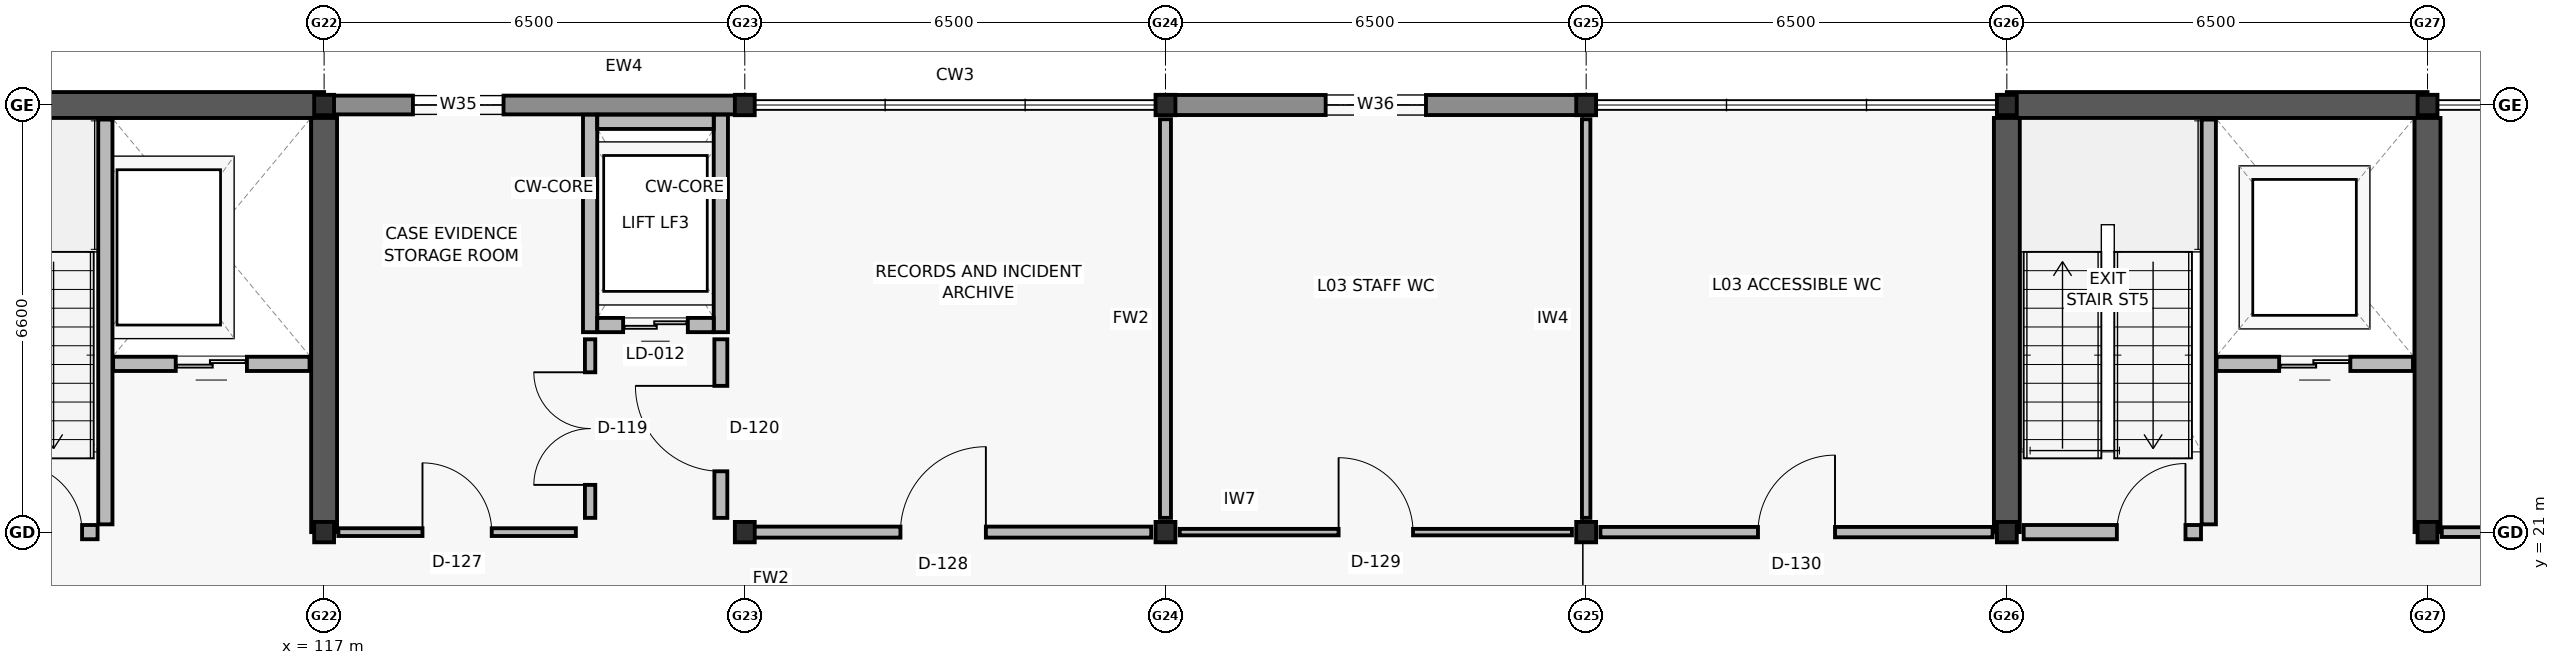
"""IFC4 building model, lengths in metres.
Left out: names, types, materials, properties, quantities, classifications, styles, units other than length and angle.
Written with IfcOpenShell. Run it as: python <this file> out.ifc"""

import sys

from ifc_helpers import new_model, si_unit, direction, frame, frame_2d, origin, origin_2d, place, context, subcontext, project, spatial, rectangle, i_section, extrude, element, fill, save


model = new_model("IFC4")
c1 = context("Model", 3, precision=1e-05, world=origin(), true_north=direction((0.0, 1.0)))
c2 = subcontext(c1, "Body", "Model", "MODEL_VIEW")
j1 = project(units=[si_unit("LENGTHUNIT", "METRE"), si_unit("PLANEANGLEUNIT", "RADIAN")], contexts=[c1])
p1 = place(None, origin())
s1 = spatial("IfcSite", under=j1, at=p1, CompositionType="ELEMENT")
p2 = place(p1, origin())
s2 = spatial("IfcBuilding", under=s1, at=p2, CompositionType="ELEMENT")
p3 = place(p2, frame((0.0, 0.0, 13.5)))
s3 = spatial("IfcBuildingStorey", under=s2, at=p3, CompositionType="ELEMENT", Elevation=13.5)
for number, where, z_axis, x_axis in (
    (1, (117.0, 21.0, 0.0), (0.0, 0.0, 1.0), (1.0, 0.0, 0.0)),
    (2, (117.0, 27.6, 0.0), (0.0, 0.0, 1.0), (1.0, 0.0, 0.0)),
    (3, (123.5, 21.0, 0.0), (0.0, 0.0, 1.0), (1.0, 0.0, 0.0)),
    (4, (123.5, 27.6, 0.0), (0.0, 0.0, 1.0), (1.0, 0.0, 0.0)),
    (5, (130.0, 21.0, 0.0), (0.0, 0.0, 1.0), (1.0, 0.0, 0.0)),
    (6, (130.0, 27.6, 0.0), (0.0, 0.0, 1.0), (1.0, 0.0, 0.0)),
    (7, (136.5, 21.0, 0.0), (0.0, 0.0, 1.0), (1.0, 0.0, 0.0)),
    (8, (136.5, 27.6, 0.0), (0.0, 0.0, 1.0), (1.0, 0.0, 0.0)),
    (9, (143.0, 21.0, 0.0), (0.0, 0.0, 1.0), (1.0, 0.0, 0.0)),
    (10, (143.0, 27.6, 0.0), (0.0, 0.0, 1.0), (1.0, 0.0, 0.0)),
    (11, (149.5, 21.0, 0.0), (0.0, 0.0, 1.0), (1.0, 0.0, 0.0)),
    (12, (149.5, 27.6, 0.0), (0.0, 0.0, 1.0), (1.0, 0.0, 0.0)),
):
    element("IfcColumn", number, at=place(p3, frame(where, z_axis=z_axis, x_axis=x_axis)), inside=s3, PredefinedType="COLUMN", context=c2, shape_type="SweptSolid", body=[
        extrude(i_section(OverallWidth=0.307, OverallDepth=0.315, WebThickness=0.012, FlangeThickness=0.019, FilletRadius=0.017, at=origin_2d()), origin(), (0.0, 0.0, 1.0), 3.9),
    ])
p4 = place(p3, frame((110.5, 27.6, 0.0), z_axis=(0.0, 0.0, 1.0), x_axis=(1.0, 0.0, 0.0)))
e13 = element("IfcWall", 13, at=p4, inside=s3, PredefinedType="SHEAR", context=c2, shape_type="SweptSolid", body=[
    extrude(rectangle(XDim=6.5, YDim=0.4, at=frame_2d((3.25, 0.0))), origin(), (0.0, 0.0, 1.0), 3.66),
])
p5 = place(p3, frame((117.0, 21.0, 0.0), z_axis=(0.0, 0.0, 1.0), x_axis=(0.0, 1.0, 0.0)))
e14 = element("IfcWall", 14, at=p5, inside=s3, PredefinedType="SHEAR", context=c2, shape_type="SweptSolid", body=[
    extrude(rectangle(XDim=6.4, YDim=0.4, at=frame_2d((3.2, 0.0))), origin(), (0.0, 0.0, 1.0), 3.66),
])
p6 = place(p3, frame((143.0, 27.6, 0.0), z_axis=(0.0, 0.0, 1.0), x_axis=(1.0, 0.0, 0.0)))
e15 = element("IfcWall", 15, at=p6, inside=s3, PredefinedType="SHEAR", context=c2, shape_type="SweptSolid", body=[
    extrude(rectangle(XDim=6.5, YDim=0.4, at=frame_2d((3.25, 0.0))), origin(), (0.0, 0.0, 1.0), 3.66),
])
for number, where, z_axis, x_axis in (
    (16, (143.0, 21.0, 0.0), (0.0, 0.0, 1.0), (0.0, 1.0, 0.0)),
    (17, (149.5, 21.0, 0.0), (0.0, 0.0, 1.0), (0.0, 1.0, 0.0)),
):
    element("IfcWall", number, at=place(p3, frame(where, z_axis=z_axis, x_axis=x_axis)), inside=s3, PredefinedType="SHEAR", context=c2, shape_type="SweptSolid", body=[
        extrude(rectangle(XDim=6.4, YDim=0.4, at=frame_2d((3.2, 0.0))), origin(), (0.0, 0.0, 1.0), 3.66),
    ])
p7 = place(p3, frame((117.005, 27.6, 0.0), z_axis=(0.0, 0.0, 1.0), x_axis=(1.0, 0.0, 0.0)))
e18 = element("IfcWall", 18, at=p7, inside=s3, PredefinedType="SOLIDWALL", context=c2, shape_type="SweptSolid", body=[
    extrude(rectangle(XDim=6.49, YDim=0.29, at=frame_2d((3.245, 0.0))), origin(), (0.0, 0.0, 1.0), 3.02),
])
p8 = place(p7, frame((1.367, 0.0, 0.8)))
e19 = element("IfcOpeningElement", 19, at=p8, cuts=e18, PredefinedType="OPENING", context=c2, shape_type="SweptSolid", body=[
    extrude(rectangle(XDim=1.4, YDim=1.5, at=frame_2d((0.7, 0.75))), frame((0.0, 0.155, 0.0), z_axis=(0.0, -1.0, 0.0), x_axis=(1.0, 0.0, 0.0)), (0.0, 0.0, 1.0), 0.31),
])
p9 = place(p3, frame((130.005, 27.6, 0.0), z_axis=(0.0, 0.0, 1.0), x_axis=(1.0, 0.0, 0.0)))
e20 = element("IfcWall", 20, at=p9, inside=s3, PredefinedType="SOLIDWALL", context=c2, shape_type="SweptSolid", body=[
    extrude(rectangle(XDim=6.49, YDim=0.31, at=frame_2d((3.245, 0.0))), origin(), (0.0, 0.0, 1.0), 3.02),
])
p10 = place(p9, frame((2.47, 0.0, 0.8)))
e21 = element("IfcOpeningElement", 21, at=p10, cuts=e20, PredefinedType="OPENING", context=c2, shape_type="SweptSolid", body=[
    extrude(rectangle(XDim=1.55, YDim=1.5, at=frame_2d((0.775, 0.75))), frame((0.0, 0.165, 0.0), z_axis=(0.0, -1.0, 0.0), x_axis=(1.0, 0.0, 0.0)), (0.0, 0.0, 1.0), 0.33),
])
p11 = place(p3, frame((113.62, 21.12, 0.0), z_axis=(0.0, 0.0, 1.0), x_axis=(0.0, 1.0, 0.0)))
e22 = element("IfcWall", 22, at=p11, inside=s3, PredefinedType="SOLIDWALL", context=c2, shape_type="SweptSolid", body=[
    extrude(rectangle(XDim=6.255, YDim=0.22, at=frame_2d((3.127, 0.0))), origin(), (0.0, 0.0, 1.0), 3.66),
])
p12 = place(p3, frame((110.76, 21.0, 0.0), z_axis=(0.0, 0.0, 1.0), x_axis=(1.0, 0.0, 0.0)))
e23 = element("IfcWall", 23, at=p12, inside=s3, PredefinedType="SOLIDWALL", context=c2, shape_type="SweptSolid", body=[
    extrude(rectangle(XDim=2.74, YDim=0.22, at=frame_2d((1.37, 0.0))), origin(), (0.0, 0.0, 1.0), 3.02),
])
p13 = place(p12, frame((1.44, 0.0, 0.0)))
e24 = element("IfcOpeningElement", 24, at=p13, cuts=e23, PredefinedType="OPENING", context=c2, shape_type="SweptSolid", body=[
    extrude(rectangle(XDim=1.06, YDim=2.1, at=frame_2d((0.53, 1.05))), frame((0.0, 0.12, 0.0), z_axis=(0.0, -1.0, 0.0), x_axis=(1.0, 0.0, 0.0)), (0.0, 0.0, 1.0), 0.24),
])
p14 = place(p3, frame((113.74, 23.6, 0.0), z_axis=(0.0, 0.0, 1.0), x_axis=(1.0, 0.0, 0.0)))
e25 = element("IfcWall", 25, at=p14, inside=s3, PredefinedType="SOLIDWALL", context=c2, shape_type="SweptSolid", body=[
    extrude(rectangle(XDim=3.035, YDim=0.22, at=frame_2d((1.518, 0.0))), origin(), (0.0, 0.0, 1.0), 3.66),
])
p15 = place(p14, frame((0.968, 0.0, 0.0)))
e26 = element("IfcOpeningElement", 26, at=p15, cuts=e25, PredefinedType="OPENING", context=c2, shape_type="SweptSolid", body=[
    extrude(rectangle(XDim=1.1, YDim=2.1, at=frame_2d((0.55, 1.05))), frame((0.0, 0.12, 0.0), z_axis=(0.0, -1.0, 0.0), x_axis=(1.0, 0.0, 0.0)), (0.0, 0.0, 1.0), 0.24),
])
for number, where, z_axis, x_axis in (
    (27, (121.11, 24.09, 0.0), (0.0, 0.0, 1.0), (0.0, 1.0, 0.0)),
    (28, (123.13, 24.09, 0.0), (0.0, 0.0, 1.0), (0.0, 1.0, 0.0)),
):
    element("IfcWall", number, at=place(p3, frame(where, z_axis=z_axis, x_axis=x_axis)), inside=s3, PredefinedType="SOLIDWALL", context=c2, shape_type="SweptSolid", body=[
        extrude(rectangle(XDim=3.36, YDim=0.22, at=frame_2d((1.68, 0.0))), origin(), (0.0, 0.0, 1.0), 3.66),
    ])
p16 = place(p3, frame((121.22, 27.34, 0.0), z_axis=(0.0, 0.0, 1.0), x_axis=(1.0, 0.0, 0.0)))
e29 = element("IfcWall", 29, at=p16, inside=s3, PredefinedType="SOLIDWALL", context=c2, shape_type="SweptSolid", body=[
    extrude(rectangle(XDim=1.8, YDim=0.22, at=frame_2d((0.9, 0.0))), origin(), (0.0, 0.0, 1.0), 3.66),
])
p17 = place(p3, frame((121.22, 24.2, 0.0), z_axis=(0.0, 0.0, 1.0), x_axis=(1.0, 0.0, 0.0)))
e30 = element("IfcWall", 30, at=p17, inside=s3, PredefinedType="SOLIDWALL", context=c2, shape_type="SweptSolid", body=[
    extrude(rectangle(XDim=1.8, YDim=0.22, at=frame_2d((0.9, 0.0))), origin(), (0.0, 0.0, 1.0), 3.66),
])
p18 = place(p17, frame((0.4, 0.0, 0.0)))
e31 = element("IfcOpeningElement", 31, at=p18, cuts=e30, PredefinedType="OPENING", context=c2, shape_type="SweptSolid", body=[
    extrude(rectangle(XDim=1.0, YDim=2.1, at=frame_2d((0.5, 1.05))), frame((0.0, 0.12, 0.0), z_axis=(0.0, -1.0, 0.0), x_axis=(1.0, 0.0, 0.0)), (0.0, 0.0, 1.0), 0.24),
])
p19 = place(p3, frame((146.12, 21.12, 0.0), z_axis=(0.0, 0.0, 1.0), x_axis=(0.0, 1.0, 0.0)))
e32 = element("IfcWall", 32, at=p19, inside=s3, PredefinedType="SOLIDWALL", context=c2, shape_type="SweptSolid", body=[
    extrude(rectangle(XDim=6.255, YDim=0.22, at=frame_2d((3.127, 0.0))), origin(), (0.0, 0.0, 1.0), 3.66),
])
p20 = place(p3, frame((143.26, 21.0, 0.0), z_axis=(0.0, 0.0, 1.0), x_axis=(1.0, 0.0, 0.0)))
e33 = element("IfcWall", 33, at=p20, inside=s3, PredefinedType="SOLIDWALL", context=c2, shape_type="SweptSolid", body=[
    extrude(rectangle(XDim=2.74, YDim=0.22, at=frame_2d((1.37, 0.0))), origin(), (0.0, 0.0, 1.0), 3.02),
])
p21 = place(p20, frame((1.44, 0.0, 0.0)))
e34 = element("IfcOpeningElement", 34, at=p21, cuts=e33, PredefinedType="OPENING", context=c2, shape_type="SweptSolid", body=[
    extrude(rectangle(XDim=1.06, YDim=2.1, at=frame_2d((0.53, 1.05))), frame((0.0, 0.12, 0.0), z_axis=(0.0, -1.0, 0.0), x_axis=(1.0, 0.0, 0.0)), (0.0, 0.0, 1.0), 0.24),
])
p22 = place(p3, frame((146.24, 23.6, 0.0), z_axis=(0.0, 0.0, 1.0), x_axis=(1.0, 0.0, 0.0)))
e35 = element("IfcWall", 35, at=p22, inside=s3, PredefinedType="SOLIDWALL", context=c2, shape_type="SweptSolid", body=[
    extrude(rectangle(XDim=3.035, YDim=0.22, at=frame_2d((1.518, 0.0))), origin(), (0.0, 0.0, 1.0), 3.66),
])
p23 = place(p22, frame((0.968, 0.0, 0.0)))
e36 = element("IfcOpeningElement", 36, at=p23, cuts=e35, PredefinedType="OPENING", context=c2, shape_type="SweptSolid", body=[
    extrude(rectangle(XDim=1.1, YDim=2.1, at=frame_2d((0.55, 1.05))), frame((0.0, 0.12, 0.0), z_axis=(0.0, -1.0, 0.0), x_axis=(1.0, 0.0, 0.0)), (0.0, 0.0, 1.0), 0.24),
])
p24 = place(p3, frame((121.11, 21.22, 0.0), z_axis=(0.0, 0.0, 1.0), x_axis=(0.0, 1.0, 0.0)))
e37 = element("IfcWall", 37, at=p24, inside=s3, PredefinedType="PARTITIONING", context=c2, shape_type="SweptSolid", body=[
    extrude(rectangle(XDim=2.76, YDim=0.16, at=frame_2d((1.38, 0.0))), origin(), (0.0, 0.0, 1.0), 3.0),
])
p25 = place(p24, frame((0.51, 0.0, 0.0)))
e38 = element("IfcOpeningElement", 38, at=p25, cuts=e37, PredefinedType="OPENING", context=c2, shape_type="SweptSolid", body=[
    extrude(rectangle(XDim=1.74, YDim=2.2, at=frame_2d((0.87, 1.1))), frame((0.0, 0.09, 0.0), z_axis=(0.0, -1.0, 0.0), x_axis=(1.0, 0.0, 0.0)), (0.0, 0.0, 1.0), 0.18),
])
p26 = place(p3, frame((123.13, 21.22, 0.0), z_axis=(0.0, 0.0, 1.0), x_axis=(0.0, 1.0, 0.0)))
e39 = element("IfcWall", 39, at=p26, inside=s3, PredefinedType="PARTITIONING", context=c2, shape_type="SweptSolid", body=[
    extrude(rectangle(XDim=2.76, YDim=0.2, at=frame_2d((1.38, 0.0))), origin(), (0.0, 0.0, 1.0), 3.0),
])
p27 = place(p26, frame((0.72, 0.0, 0.0)))
e40 = element("IfcOpeningElement", 40, at=p27, cuts=e39, PredefinedType="OPENING", context=c2, shape_type="SweptSolid", body=[
    extrude(rectangle(XDim=1.32, YDim=2.12, at=frame_2d((0.66, 1.06))), frame((0.0, 0.11, 0.0), z_axis=(0.0, -1.0, 0.0), x_axis=(1.0, 0.0, 0.0)), (0.0, 0.0, 1.0), 0.22),
])
p28 = place(p3, frame((117.22, 21.0, 0.0), z_axis=(0.0, 0.0, 1.0), x_axis=(1.0, 0.0, 0.0)))
e41 = element("IfcWall", 41, at=p28, inside=s3, PredefinedType="PARTITIONING", context=c2, shape_type="SweptSolid", body=[
    extrude(rectangle(XDim=3.67, YDim=0.12, at=frame_2d((1.835, 0.0))), origin(), (0.0, 0.0, 1.0), 3.0),
])
p29 = place(p28, frame((1.3, 0.0, 0.0)))
e42 = element("IfcOpeningElement", 42, at=p29, cuts=e41, PredefinedType="OPENING", context=c2, shape_type="SweptSolid", body=[
    extrude(rectangle(XDim=1.07, YDim=2.08, at=frame_2d((0.535, 1.04))), frame((0.0, 0.07, 0.0), z_axis=(0.0, -1.0, 0.0), x_axis=(1.0, 0.0, 0.0)), (0.0, 0.0, 1.0), 0.14),
])
p30 = place(p3, frame((123.35, 21.0, 0.0), z_axis=(0.0, 0.0, 1.0), x_axis=(1.0, 0.0, 0.0)))
e43 = element("IfcWall", 43, at=p30, inside=s3, PredefinedType="PARTITIONING", context=c2, shape_type="SweptSolid", body=[
    extrude(rectangle(XDim=6.43, YDim=0.17, at=frame_2d((3.215, 0.0))), origin(), (0.0, 0.0, 1.0), 3.0),
])
p31 = place(p30, frame((2.555, 0.0, 0.0)))
e44 = element("IfcOpeningElement", 44, at=p31, cuts=e43, PredefinedType="OPENING", context=c2, shape_type="SweptSolid", body=[
    extrude(rectangle(XDim=1.32, YDim=2.12, at=frame_2d((0.66, 1.06))), frame((0.0, 0.095, 0.0), z_axis=(0.0, -1.0, 0.0), x_axis=(1.0, 0.0, 0.0)), (0.0, 0.0, 1.0), 0.19),
])
p32 = place(p3, frame((130.22, 21.0, 0.0), z_axis=(0.0, 0.0, 1.0), x_axis=(1.0, 0.0, 0.0)))
e45 = element("IfcWall", 45, at=p32, inside=s3, PredefinedType="PARTITIONING", context=c2, shape_type="SweptSolid", body=[
    extrude(rectangle(XDim=6.06, YDim=0.1, at=frame_2d((3.03, 0.0))), origin(), (0.0, 0.0, 1.0), 3.0),
])
p33 = place(p32, frame((2.455, 0.0, 0.0)))
e46 = element("IfcOpeningElement", 46, at=p33, cuts=e45, PredefinedType="OPENING", context=c2, shape_type="SweptSolid", body=[
    extrude(rectangle(XDim=1.15, YDim=2.12, at=frame_2d((0.575, 1.06))), frame((0.0, 0.06, 0.0), z_axis=(0.0, -1.0, 0.0), x_axis=(1.0, 0.0, 0.0)), (0.0, 0.0, 1.0), 0.12),
])
p34 = place(p3, frame((136.72, 21.0, 0.0), z_axis=(0.0, 0.0, 1.0), x_axis=(1.0, 0.0, 0.0)))
e47 = element("IfcWall", 47, at=p34, inside=s3, PredefinedType="PARTITIONING", context=c2, shape_type="SweptSolid", body=[
    extrude(rectangle(XDim=6.06, YDim=0.16, at=frame_2d((3.03, 0.0))), origin(), (0.0, 0.0, 1.0), 3.0),
])
p35 = place(p34, frame((2.435, 0.0, 0.0)))
e48 = element("IfcOpeningElement", 48, at=p35, cuts=e47, PredefinedType="OPENING", context=c2, shape_type="SweptSolid", body=[
    extrude(rectangle(XDim=1.19, YDim=2.14, at=frame_2d((0.595, 1.07))), frame((0.0, 0.09, 0.0), z_axis=(0.0, -1.0, 0.0), x_axis=(1.0, 0.0, 0.0)), (0.0, 0.0, 1.0), 0.18),
])
p36 = place(p3, frame((149.72, 21.0, 0.0), z_axis=(0.0, 0.0, 1.0), x_axis=(1.0, 0.0, 0.0)))
e49 = element("IfcWall", 49, at=p36, inside=s3, PredefinedType="PARTITIONING", context=c2, shape_type="SweptSolid", body=[
    extrude(rectangle(XDim=12.46, YDim=0.15, at=frame_2d((6.23, 0.0))), origin(), (0.0, 0.0, 1.0), 3.0),
])
p37 = place(p36, frame((6.615, 0.0, 0.0)))
e50 = element("IfcOpeningElement", 50, at=p37, cuts=e49, PredefinedType="OPENING", context=c2, shape_type="SweptSolid", body=[
    extrude(rectangle(XDim=1.23, YDim=2.08, at=frame_2d((0.615, 1.04))), frame((0.0, 0.085, 0.0), z_axis=(0.0, -1.0, 0.0), x_axis=(1.0, 0.0, 0.0)), (0.0, 0.0, 1.0), 0.17),
])
p38 = place(p3, frame((130.0, 21.22, 0.0), z_axis=(0.0, 0.0, 1.0), x_axis=(0.0, 1.0, 0.0)))
e51 = element("IfcWall", 51, at=p38, inside=s3, PredefinedType="PARTITIONING", context=c2, shape_type="SweptSolid", body=[
    extrude(rectangle(XDim=6.16, YDim=0.17, at=frame_2d((3.08, 0.0))), origin(), (0.0, 0.0, 1.0), 3.0),
])
p39 = place(p3, frame((136.5, 21.22, 0.0), z_axis=(0.0, 0.0, 1.0), x_axis=(0.0, 1.0, 0.0)))
e52 = element("IfcWall", 52, at=p39, inside=s3, PredefinedType="PARTITIONING", context=c2, shape_type="SweptSolid", body=[
    extrude(rectangle(XDim=6.16, YDim=0.13, at=frame_2d((3.08, 0.0))), origin(), (0.0, 0.0, 1.0), 3.0),
])
p40 = place(p8, origin())
e53 = element("IfcWindow", 53, at=p40, inside=s3, PartitioningType="SINGLE_PANEL", PredefinedType="WINDOW", context=c2, shape_type="SweptSolid", body=[
    extrude(rectangle(XDim=1.4, YDim=1.5, at=frame_2d((0.7, 0.75))), frame((0.0, 0.03, 0.0), z_axis=(0.0, -1.0, 0.0), x_axis=(1.0, 0.0, 0.0)), (0.0, 0.0, 1.0), 0.06),
])
fill(e19, e53)
p41 = place(p10, origin())
e54 = element("IfcWindow", 54, at=p41, inside=s3, PartitioningType="SINGLE_PANEL", PredefinedType="WINDOW", context=c2, shape_type="SweptSolid", body=[
    extrude(rectangle(XDim=1.55, YDim=1.5, at=frame_2d((0.775, 0.75))), frame((0.0, 0.03, 0.0), z_axis=(0.0, -1.0, 0.0), x_axis=(1.0, 0.0, 0.0)), (0.0, 0.0, 1.0), 0.06),
])
fill(e21, e54)
p42 = place(p13, origin())
e55 = element("IfcDoor", 55, at=p42, inside=s3, OperationType="SINGLE_SWING_LEFT", PredefinedType="DOOR", context=c2, shape_type="SweptSolid", body=[
    extrude(rectangle(XDim=1.06, YDim=2.1, at=frame_2d((0.53, 1.05))), frame((0.0, 0.025, 0.0), z_axis=(0.0, -1.0, 0.0), x_axis=(1.0, 0.0, 0.0)), (0.0, 0.0, 1.0), 0.05),
])
fill(e24, e55)
p43 = place(p15, origin())
e56 = element("IfcDoor", 56, at=p43, inside=s3, OperationType="DOUBLE_DOOR_SLIDING", PredefinedType="DOOR", context=c2, shape_type="SweptSolid", body=[
    extrude(rectangle(XDim=1.1, YDim=2.1, at=frame_2d((0.55, 1.05))), frame((0.0, 0.025, 0.0), z_axis=(0.0, -1.0, 0.0), x_axis=(1.0, 0.0, 0.0)), (0.0, 0.0, 1.0), 0.05),
])
fill(e26, e56)
p44 = place(p18, origin())
e57 = element("IfcDoor", 57, at=p44, inside=s3, OperationType="DOUBLE_DOOR_SLIDING", PredefinedType="DOOR", context=c2, shape_type="SweptSolid", body=[
    extrude(rectangle(XDim=1.0, YDim=2.1, at=frame_2d((0.5, 1.05))), frame((0.0, 0.025, 0.0), z_axis=(0.0, -1.0, 0.0), x_axis=(1.0, 0.0, 0.0)), (0.0, 0.0, 1.0), 0.05),
])
fill(e31, e57)
p45 = place(p21, origin())
e58 = element("IfcDoor", 58, at=p45, inside=s3, OperationType="SINGLE_SWING_RIGHT", PredefinedType="DOOR", context=c2, shape_type="SweptSolid", body=[
    extrude(rectangle(XDim=1.06, YDim=2.1, at=frame_2d((0.53, 1.05))), frame((0.0, 0.025, 0.0), z_axis=(0.0, -1.0, 0.0), x_axis=(1.0, 0.0, 0.0)), (0.0, 0.0, 1.0), 0.05),
])
fill(e34, e58)
p46 = place(p23, origin())
e59 = element("IfcDoor", 59, at=p46, inside=s3, OperationType="DOUBLE_DOOR_SLIDING", PredefinedType="DOOR", context=c2, shape_type="SweptSolid", body=[
    extrude(rectangle(XDim=1.1, YDim=2.1, at=frame_2d((0.55, 1.05))), frame((0.0, 0.025, 0.0), z_axis=(0.0, -1.0, 0.0), x_axis=(1.0, 0.0, 0.0)), (0.0, 0.0, 1.0), 0.05),
])
fill(e36, e59)
p47 = place(p25, origin())
e60 = element("IfcDoor", 60, at=p47, inside=s3, OperationType="DOUBLE_DOOR_SINGLE_SWING", PredefinedType="DOOR", context=c2, shape_type="SweptSolid", body=[
    extrude(rectangle(XDim=1.74, YDim=2.2, at=frame_2d((0.87, 1.1))), frame((0.0, 0.025, 0.0), z_axis=(0.0, -1.0, 0.0), x_axis=(1.0, 0.0, 0.0)), (0.0, 0.0, 1.0), 0.05),
])
fill(e38, e60)
p48 = place(p27, origin())
e61 = element("IfcDoor", 61, at=p48, inside=s3, OperationType="SINGLE_SWING_RIGHT", PredefinedType="DOOR", context=c2, shape_type="SweptSolid", body=[
    extrude(rectangle(XDim=1.32, YDim=2.12, at=frame_2d((0.66, 1.06))), frame((0.0, 0.025, 0.0), z_axis=(0.0, -1.0, 0.0), x_axis=(1.0, 0.0, 0.0)), (0.0, 0.0, 1.0), 0.05),
])
fill(e40, e61)
p49 = place(p29, origin())
e62 = element("IfcDoor", 62, at=p49, inside=s3, OperationType="SINGLE_SWING_LEFT", PredefinedType="DOOR", context=c2, shape_type="SweptSolid", body=[
    extrude(rectangle(XDim=1.07, YDim=2.08, at=frame_2d((0.535, 1.04))), frame((0.0, 0.025, 0.0), z_axis=(0.0, -1.0, 0.0), x_axis=(1.0, 0.0, 0.0)), (0.0, 0.0, 1.0), 0.05),
])
fill(e42, e62)
p50 = place(p31, origin())
e63 = element("IfcDoor", 63, at=p50, inside=s3, OperationType="SINGLE_SWING_RIGHT", PredefinedType="DOOR", context=c2, shape_type="SweptSolid", body=[
    extrude(rectangle(XDim=1.32, YDim=2.12, at=frame_2d((0.66, 1.06))), frame((0.0, 0.025, 0.0), z_axis=(0.0, -1.0, 0.0), x_axis=(1.0, 0.0, 0.0)), (0.0, 0.0, 1.0), 0.05),
])
fill(e44, e63)
p51 = place(p33, origin())
e64 = element("IfcDoor", 64, at=p51, inside=s3, OperationType="SINGLE_SWING_LEFT", PredefinedType="DOOR", context=c2, shape_type="SweptSolid", body=[
    extrude(rectangle(XDim=1.15, YDim=2.12, at=frame_2d((0.575, 1.06))), frame((0.0, 0.025, 0.0), z_axis=(0.0, -1.0, 0.0), x_axis=(1.0, 0.0, 0.0)), (0.0, 0.0, 1.0), 0.05),
])
fill(e46, e64)
p52 = place(p35, origin())
e65 = element("IfcDoor", 65, at=p52, inside=s3, OperationType="SINGLE_SWING_RIGHT", PredefinedType="DOOR", context=c2, shape_type="SweptSolid", body=[
    extrude(rectangle(XDim=1.19, YDim=2.14, at=frame_2d((0.595, 1.07))), frame((0.0, 0.025, 0.0), z_axis=(0.0, -1.0, 0.0), x_axis=(1.0, 0.0, 0.0)), (0.0, 0.0, 1.0), 0.05),
])
fill(e48, e65)
save(model, sys.argv[1])
